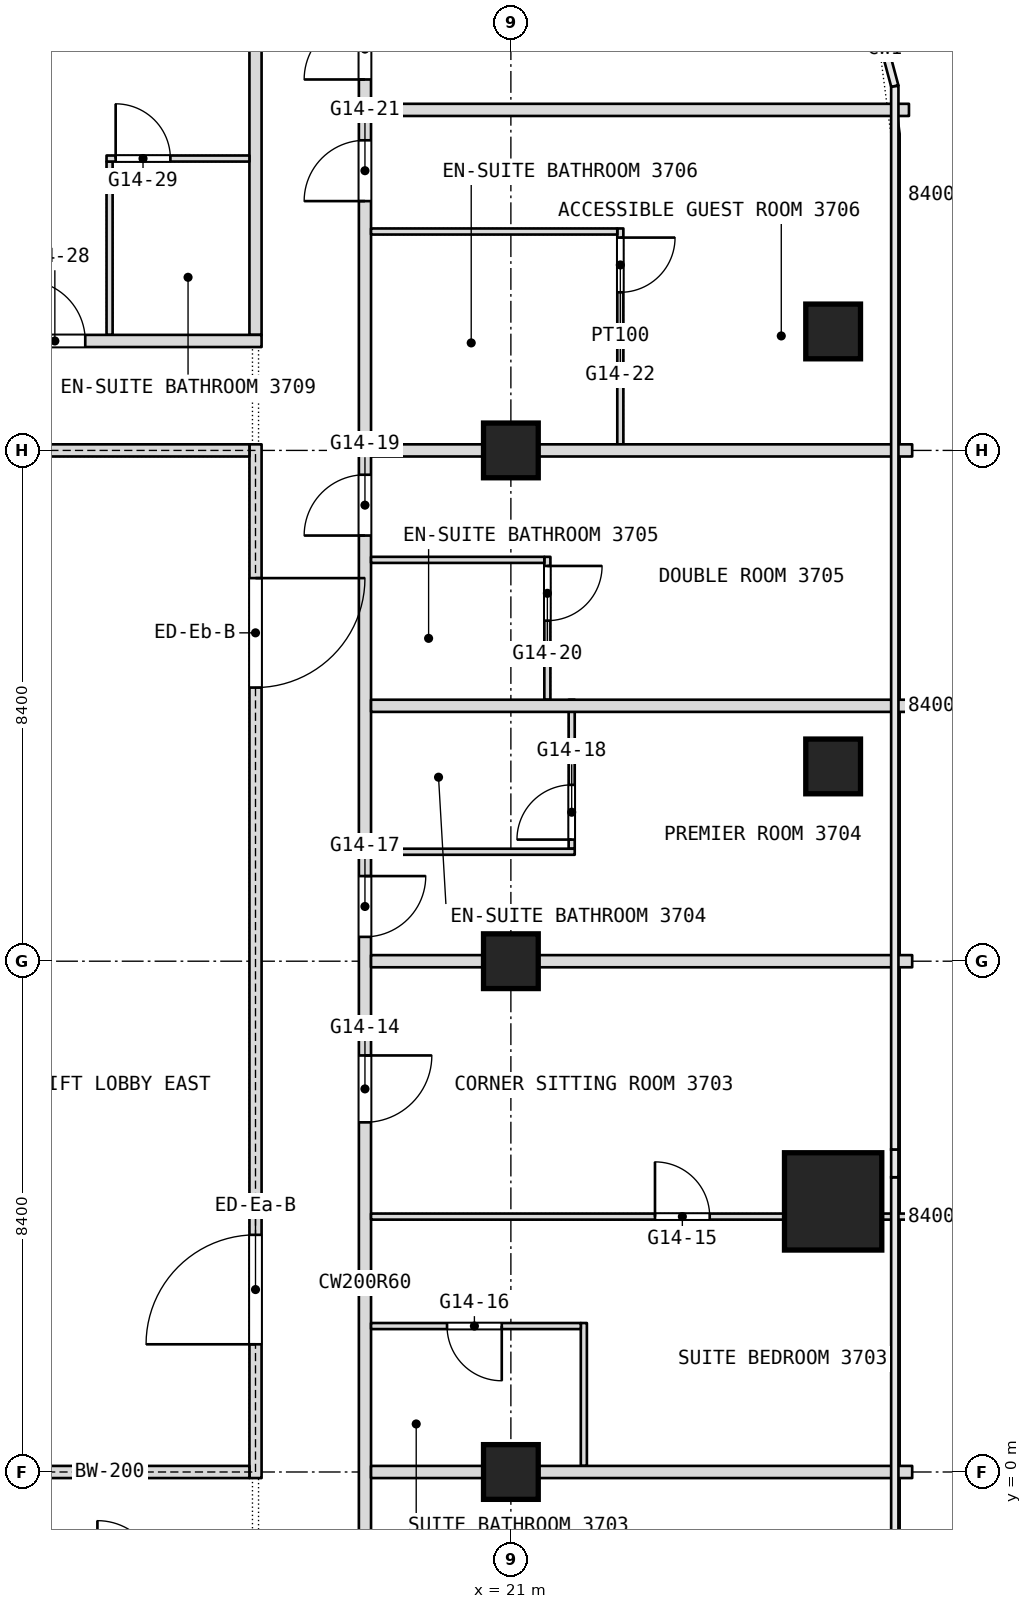
"""IFC4 building model, lengths in metres.
Left out: names, types, materials, properties, quantities, classifications, styles, units other than length and angle.
Written with IfcOpenShell. Run it as: python <this file> out.ifc"""

import sys

from ifc_helpers import new_model, si_unit, direction, frame, frame_2d, origin, origin_2d, place, context, subcontext, project, spatial, rectangle, extrude, element, fill, save


model = new_model("IFC4")
c1 = context("Model", 3, precision=1e-05, world=origin(), true_north=direction((0.0, 1.0)))
c2 = subcontext(c1, "Body", "Model", "MODEL_VIEW")
j1 = project(units=[si_unit("LENGTHUNIT", "METRE"), si_unit("PLANEANGLEUNIT", "RADIAN")], contexts=[c1])
p1 = place(None, origin())
s1 = spatial("IfcSite", under=j1, at=p1, CompositionType="ELEMENT")
p2 = place(p1, origin())
s2 = spatial("IfcBuilding", under=s1, at=p2, CompositionType="ELEMENT")
p3 = place(p2, frame((0.0, 0.0, 158.9)))
s3 = spatial("IfcBuildingStorey", under=s2, at=p3, CompositionType="ELEMENT", Elevation=158.9)
p4 = place(p3, frame((26.3, 4.45, 0.0), z_axis=(0.0, 0.0, 1.0), x_axis=(1.0, 0.0, 0.0)))
e1 = element("IfcColumn", 1, at=p4, inside=s3, PredefinedType="COLUMN", context=c2, shape_type="SweptSolid", body=[
    extrude(rectangle(XDim=1.6, YDim=1.6, at=origin_2d()), origin(), (0.0, 0.0, 1.0), 3.6),
])
for number, where, z_axis, x_axis in (
    (2, (21.0, 0.0, 0.0), (0.0, 0.0, 1.0), (1.0, 0.0, 0.0)),
    (3, (21.0, 8.4, 0.0), (0.0, 0.0, 1.0), (1.0, 0.0, 0.0)),
    (4, (21.0, 16.8, 0.0), (0.0, 0.0, 1.0), (1.0, 0.0, 0.0)),
    (5, (26.3, 18.756, 0.0), (0.0, 0.0, 1.0), (1.0, 0.0, 0.0)),
    (6, (26.3, 11.603, 0.0), (0.0, 0.0, 1.0), (1.0, 0.0, 0.0)),
):
    element("IfcColumn", number, at=place(p3, frame(where, z_axis=z_axis, x_axis=x_axis)), inside=s3, PredefinedType="COLUMN", context=c2, shape_type="SweptSolid", body=[
        extrude(rectangle(XDim=0.9, YDim=0.9, at=origin_2d()), origin(), (0.0, 0.0, 1.0), 3.6),
    ])
p5 = place(p3, frame((22.8, 16.9, 0.0), z_axis=(0.0, 0.0, 1.0), x_axis=(0.0, 1.0, 0.0)))
e7 = element("IfcWall", 7, at=p5, inside=s3, PredefinedType="PARTITIONING", context=c2, shape_type="SweptSolid", body=[
    extrude(rectangle(XDim=3.55, YDim=0.1, at=frame_2d((1.775, 0.0))), origin(), (0.0, 0.0, 1.0), 3.34),
])
p6 = place(p5, frame((2.5, 0.0, 0.0)))
e8 = element("IfcOpeningElement", 8, at=p6, cuts=e7, PredefinedType="OPENING", context=c2, shape_type="SweptSolid", body=[
    extrude(rectangle(XDim=0.9, YDim=2.1, at=frame_2d((0.45, 1.05))), frame((0.0, 0.05, 0.0), z_axis=(0.0, -1.0, 0.0), x_axis=(1.0, 0.0, 0.0)), (0.0, 0.0, 1.0), 0.1),
])
p7 = place(p3, frame((22.2, 0.1, 0.0), z_axis=(0.0, 0.0, 1.0), x_axis=(0.0, 1.0, 0.0)))
e9 = element("IfcWall", 9, at=p7, inside=s3, PredefinedType="PARTITIONING", context=c2, shape_type="SweptSolid", body=[
    extrude(rectangle(XDim=2.35, YDim=0.1, at=frame_2d((1.175, 0.0))), origin(), (0.0, 0.0, 1.0), 3.34),
])
p8 = place(p3, frame((22.0, 10.25, 0.0), z_axis=(0.0, 0.0, 1.0), x_axis=(0.0, 1.0, 0.0)))
e10 = element("IfcWall", 10, at=p8, inside=s3, PredefinedType="PARTITIONING", context=c2, shape_type="SweptSolid", body=[
    extrude(rectangle(XDim=2.45, YDim=0.1, at=frame_2d((1.225, 0.0))), origin(), (0.0, 0.0, 1.0), 3.34),
])
p9 = place(p8, frame((0.15, 0.0, 0.0)))
e11 = element("IfcOpeningElement", 11, at=p9, cuts=e10, PredefinedType="OPENING", context=c2, shape_type="SweptSolid", body=[
    extrude(rectangle(XDim=0.9, YDim=2.1, at=frame_2d((0.45, 1.05))), frame((0.0, 0.05, 0.0), z_axis=(0.0, -1.0, 0.0), x_axis=(1.0, 0.0, 0.0)), (0.0, 0.0, 1.0), 0.1),
])
p10 = place(p3, frame((21.6, 12.7, 0.0), z_axis=(0.0, 0.0, 1.0), x_axis=(0.0, 1.0, 0.0)))
e12 = element("IfcWall", 12, at=p10, inside=s3, PredefinedType="PARTITIONING", context=c2, shape_type="SweptSolid", body=[
    extrude(rectangle(XDim=2.35, YDim=0.1, at=frame_2d((1.175, 0.0))), origin(), (0.0, 0.0, 1.0), 3.34),
])
p11 = place(p10, frame((1.3, 0.0, 0.0)))
e13 = element("IfcOpeningElement", 13, at=p11, cuts=e12, PredefinedType="OPENING", context=c2, shape_type="SweptSolid", body=[
    extrude(rectangle(XDim=0.9, YDim=2.1, at=frame_2d((0.45, 1.05))), frame((0.0, 0.05, 0.0), z_axis=(0.0, -1.0, 0.0), x_axis=(1.0, 0.0, 0.0)), (0.0, 0.0, 1.0), 0.1),
])
p12 = place(p3, frame((18.6, -21.708, 0.0), z_axis=(0.0, 0.0, 1.0), x_axis=(0.0, 1.0, 0.0)))
e14 = element("IfcWall", 14, at=p12, inside=s3, PredefinedType="PARTITIONING", context=c2, shape_type="SweptSolid", body=[
    extrude(rectangle(XDim=49.648, YDim=0.2, at=frame_2d((24.824, 0.0))), origin(), (0.0, 0.0, 1.0), 3.34),
])
p13 = place(p12, frame((2.204, 0.0, 0.0)))
e15 = element("IfcOpeningElement", 15, at=p13, cuts=e14, PredefinedType="OPENING", context=c2, shape_type="SweptSolid", body=[
    extrude(rectangle(XDim=0.9, YDim=2.1, at=frame_2d((0.45, 1.05))), frame((0.0, 0.1, 0.0), z_axis=(0.0, -1.0, 0.0), x_axis=(1.0, 0.0, 0.0)), (0.0, 0.0, 1.0), 0.2),
])
p14 = place(p12, frame((8.608, 0.0, 0.0)))
e16 = element("IfcOpeningElement", 16, at=p14, cuts=e14, PredefinedType="OPENING", context=c2, shape_type="SweptSolid", body=[
    extrude(rectangle(XDim=1.1, YDim=2.1, at=frame_2d((0.55, 1.05))), frame((0.0, 0.1, 0.0), z_axis=(0.0, -1.0, 0.0), x_axis=(1.0, 0.0, 0.0)), (0.0, 0.0, 1.0), 0.2),
])
p15 = place(p12, frame((16.608, 0.0, 0.0)))
e17 = element("IfcOpeningElement", 17, at=p15, cuts=e14, PredefinedType="OPENING", context=c2, shape_type="SweptSolid", body=[
    extrude(rectangle(XDim=1.8, YDim=2.1, at=frame_2d((0.9, 1.05))), frame((0.0, 0.1, 0.0), z_axis=(0.0, -1.0, 0.0), x_axis=(1.0, 0.0, 0.0)), (0.0, 0.0, 1.0), 0.2),
])
p16 = place(p12, frame((27.458, 0.0, 0.0)))
e18 = element("IfcOpeningElement", 18, at=p16, cuts=e14, PredefinedType="OPENING", context=c2, shape_type="SweptSolid", body=[
    extrude(rectangle(XDim=1.1, YDim=2.1, at=frame_2d((0.55, 1.05))), frame((0.0, 0.1, 0.0), z_axis=(0.0, -1.0, 0.0), x_axis=(1.0, 0.0, 0.0)), (0.0, 0.0, 1.0), 0.2),
])
p17 = place(p12, frame((30.508, 0.0, 0.0)))
e19 = element("IfcOpeningElement", 19, at=p17, cuts=e14, PredefinedType="OPENING", context=c2, shape_type="SweptSolid", body=[
    extrude(rectangle(XDim=1.0, YDim=2.1, at=frame_2d((0.5, 1.05))), frame((0.0, 0.1, 0.0), z_axis=(0.0, -1.0, 0.0), x_axis=(1.0, 0.0, 0.0)), (0.0, 0.0, 1.0), 0.2),
])
p18 = place(p12, frame((37.108, 0.0, 0.0)))
e20 = element("IfcOpeningElement", 20, at=p18, cuts=e14, PredefinedType="OPENING", context=c2, shape_type="SweptSolid", body=[
    extrude(rectangle(XDim=1.0, YDim=2.1, at=frame_2d((0.5, 1.05))), frame((0.0, 0.1, 0.0), z_axis=(0.0, -1.0, 0.0), x_axis=(1.0, 0.0, 0.0)), (0.0, 0.0, 1.0), 0.2),
])
p19 = place(p12, frame((42.608, 0.0, 0.0)))
e21 = element("IfcOpeningElement", 21, at=p19, cuts=e14, PredefinedType="OPENING", context=c2, shape_type="SweptSolid", body=[
    extrude(rectangle(XDim=1.0, YDim=2.1, at=frame_2d((0.5, 1.05))), frame((0.0, 0.1, 0.0), z_axis=(0.0, -1.0, 0.0), x_axis=(1.0, 0.0, 0.0)), (0.0, 0.0, 1.0), 0.2),
])
p20 = place(p12, frame((44.608, 0.0, 0.0)))
e22 = element("IfcOpeningElement", 22, at=p20, cuts=e14, PredefinedType="OPENING", context=c2, shape_type="SweptSolid", body=[
    extrude(rectangle(XDim=1.0, YDim=2.1, at=frame_2d((0.5, 1.05))), frame((0.0, 0.1, 0.0), z_axis=(0.0, -1.0, 0.0), x_axis=(1.0, 0.0, 0.0)), (0.0, 0.0, 1.0), 0.2),
])
p21 = place(p3, frame((16.8, 18.7, 0.0), z_axis=(0.0, 0.0, 1.0), x_axis=(0.0, 1.0, 0.0)))
e23 = element("IfcWall", 23, at=p21, inside=s3, PredefinedType="PARTITIONING", context=c2, shape_type="SweptSolid", body=[
    extrude(rectangle(XDim=9.24, YDim=0.2, at=frame_2d((4.62, 0.0))), origin(), (0.0, 0.0, 1.0), 3.34),
])
p22 = place(p3, frame((14.4, 18.7, 0.0), z_axis=(0.0, 0.0, 1.0), x_axis=(0.0, 1.0, 0.0)))
e24 = element("IfcWall", 24, at=p22, inside=s3, PredefinedType="PARTITIONING", context=c2, shape_type="SweptSolid", body=[
    extrude(rectangle(XDim=2.85, YDim=0.1, at=frame_2d((1.425, 0.0))), origin(), (0.0, 0.0, 1.0), 3.34),
])
p23 = place(p3, frame((18.7, 0.0, 0.0), z_axis=(0.0, 0.0, 1.0), x_axis=(1.0, 0.0, 0.0)))
e25 = element("IfcWall", 25, at=p23, inside=s3, PredefinedType="PARTITIONING", context=c2, shape_type="SweptSolid", body=[
    extrude(rectangle(XDim=8.9, YDim=0.2, at=frame_2d((4.45, 0.0))), origin(), (0.0, 0.0, 1.0), 2.89),
])
p24 = place(p3, frame((18.7, 2.4, 0.0), z_axis=(0.0, 0.0, 1.0), x_axis=(1.0, 0.0, 0.0)))
e26 = element("IfcWall", 26, at=p24, inside=s3, PredefinedType="PARTITIONING", context=c2, shape_type="SweptSolid", body=[
    extrude(rectangle(XDim=3.45, YDim=0.1, at=frame_2d((1.725, 0.0))), origin(), (0.0, 0.0, 1.0), 3.34),
])
p25 = place(p24, frame((1.25, 0.0, 0.0)))
e27 = element("IfcOpeningElement", 27, at=p25, cuts=e26, PredefinedType="OPENING", context=c2, shape_type="SweptSolid", body=[
    extrude(rectangle(XDim=0.9, YDim=2.1, at=frame_2d((0.45, 1.05))), frame((0.0, 0.05, 0.0), z_axis=(0.0, -1.0, 0.0), x_axis=(1.0, 0.0, 0.0)), (0.0, 0.0, 1.0), 0.1),
])
p26 = place(p3, frame((18.7, 4.2, 0.0), z_axis=(0.0, 0.0, 1.0), x_axis=(1.0, 0.0, 0.0)))
e28 = element("IfcWall", 28, at=p26, inside=s3, PredefinedType="PARTITIONING", context=c2, shape_type="SweptSolid", body=[
    extrude(rectangle(XDim=6.8, YDim=0.1, at=frame_2d((3.4, 0.0))), origin(), (0.0, 0.0, 1.0), 3.34),
])
p27 = place(p26, frame((4.67, 0.0, 0.0)))
e29 = element("IfcOpeningElement", 29, at=p27, cuts=e28, PredefinedType="OPENING", context=c2, shape_type="SweptSolid", body=[
    extrude(rectangle(XDim=0.9, YDim=2.1, at=frame_2d((0.45, 1.05))), frame((0.0, 0.05, 0.0), z_axis=(0.0, -1.0, 0.0), x_axis=(1.0, 0.0, 0.0)), (0.0, 0.0, 1.0), 0.1),
])
p28 = place(p3, frame((27.1, 4.2, 0.0), z_axis=(0.0, 0.0, 1.0), x_axis=(1.0, 0.0, 0.0)))
e30 = element("IfcWall", 30, at=p28, inside=s3, PredefinedType="PARTITIONING", context=c2, shape_type="SweptSolid", body=[
    extrude(rectangle(XDim=0.5, YDim=0.1, at=frame_2d((0.25, 0.0))), origin(), (0.0, 0.0, 1.0), 3.34),
])
p29 = place(p3, frame((18.7, 8.4, 0.0), z_axis=(0.0, 0.0, 1.0), x_axis=(1.0, 0.0, 0.0)))
e31 = element("IfcWall", 31, at=p29, inside=s3, PredefinedType="PARTITIONING", context=c2, shape_type="SweptSolid", body=[
    extrude(rectangle(XDim=8.9, YDim=0.2, at=frame_2d((4.45, 0.0))), origin(), (0.0, 0.0, 1.0), 2.89),
])
p30 = place(p3, frame((18.7, 10.2, 0.0), z_axis=(0.0, 0.0, 1.0), x_axis=(1.0, 0.0, 0.0)))
e32 = element("IfcWall", 32, at=p30, inside=s3, PredefinedType="PARTITIONING", context=c2, shape_type="SweptSolid", body=[
    extrude(rectangle(XDim=3.35, YDim=0.1, at=frame_2d((1.675, 0.0))), origin(), (0.0, 0.0, 1.0), 3.34),
])
p31 = place(p3, frame((18.7, 12.6, 0.0), z_axis=(0.0, 0.0, 1.0), x_axis=(1.0, 0.0, 0.0)))
e33 = element("IfcWall", 33, at=p31, inside=s3, PredefinedType="PARTITIONING", context=c2, shape_type="SweptSolid", body=[
    extrude(rectangle(XDim=8.9, YDim=0.2, at=frame_2d((4.45, 0.0))), origin(), (0.0, 0.0, 1.0), 3.34),
])
p32 = place(p3, frame((18.7, 15.0, 0.0), z_axis=(0.0, 0.0, 1.0), x_axis=(1.0, 0.0, 0.0)))
e34 = element("IfcWall", 34, at=p32, inside=s3, PredefinedType="PARTITIONING", context=c2, shape_type="SweptSolid", body=[
    extrude(rectangle(XDim=2.85, YDim=0.1, at=frame_2d((1.425, 0.0))), origin(), (0.0, 0.0, 1.0), 3.34),
])
p33 = place(p3, frame((18.7, 16.8, 0.0), z_axis=(0.0, 0.0, 1.0), x_axis=(1.0, 0.0, 0.0)))
e35 = element("IfcWall", 35, at=p33, inside=s3, PredefinedType="PARTITIONING", context=c2, shape_type="SweptSolid", body=[
    extrude(rectangle(XDim=8.9, YDim=0.2, at=frame_2d((4.45, 0.0))), origin(), (0.0, 0.0, 1.0), 2.89),
])
p34 = place(p3, frame((10.7, 18.6, 0.0), z_axis=(0.0, 0.0, 1.0), x_axis=(1.0, 0.0, 0.0)))
e36 = element("IfcWall", 36, at=p34, inside=s3, PredefinedType="PARTITIONING", context=c2, shape_type="SweptSolid", body=[
    extrude(rectangle(XDim=6.2, YDim=0.2, at=frame_2d((3.1, 0.0))), origin(), (0.0, 0.0, 1.0), 3.34),
])
p35 = place(p34, frame((2.3, 0.0, 0.0)))
e37 = element("IfcOpeningElement", 37, at=p35, cuts=e36, PredefinedType="OPENING", context=c2, shape_type="SweptSolid", body=[
    extrude(rectangle(XDim=1.0, YDim=2.1, at=frame_2d((0.5, 1.05))), frame((0.0, 0.1, 0.0), z_axis=(0.0, -1.0, 0.0), x_axis=(1.0, 0.0, 0.0)), (0.0, 0.0, 1.0), 0.2),
])
p36 = place(p3, frame((18.7, 20.4, 0.0), z_axis=(0.0, 0.0, 1.0), x_axis=(1.0, 0.0, 0.0)))
e38 = element("IfcWall", 38, at=p36, inside=s3, PredefinedType="PARTITIONING", context=c2, shape_type="SweptSolid", body=[
    extrude(rectangle(XDim=4.05, YDim=0.1, at=frame_2d((2.025, 0.0))), origin(), (0.0, 0.0, 1.0), 3.34),
])
p37 = place(p3, frame((14.35, 21.6, 0.0), z_axis=(0.0, 0.0, 1.0), x_axis=(1.0, 0.0, 0.0)))
e39 = element("IfcWall", 39, at=p37, inside=s3, PredefinedType="PARTITIONING", context=c2, shape_type="SweptSolid", body=[
    extrude(rectangle(XDim=2.35, YDim=0.1, at=frame_2d((1.175, 0.0))), origin(), (0.0, 0.0, 1.0), 3.34),
])
p38 = place(p37, frame((0.15, 0.0, 0.0)))
e40 = element("IfcOpeningElement", 40, at=p38, cuts=e39, PredefinedType="OPENING", context=c2, shape_type="SweptSolid", body=[
    extrude(rectangle(XDim=0.9, YDim=2.1, at=frame_2d((0.45, 1.05))), frame((0.0, 0.05, 0.0), z_axis=(0.0, -1.0, 0.0), x_axis=(1.0, 0.0, 0.0)), (0.0, 0.0, 1.0), 0.1),
])
p39 = place(p3, frame((18.7, 22.4, 0.0), z_axis=(0.0, 0.0, 1.0), x_axis=(1.0, 0.0, 0.0)))
e41 = element("IfcWall", 41, at=p39, inside=s3, PredefinedType="PARTITIONING", context=c2, shape_type="SweptSolid", body=[
    extrude(rectangle(XDim=8.847, YDim=0.2, at=frame_2d((4.424, 0.0))), origin(), (0.0, 0.0, 1.0), 3.34),
])
p40 = place(p3, frame((16.8, -0.1, 0.0), z_axis=(0.0, 0.0, 1.0), x_axis=(0.0, 1.0, 0.0)))
e42 = element("IfcWall", 42, at=p40, inside=s3, PredefinedType="PARTITIONING", context=c2, shape_type="SweptSolid", body=[
    extrude(rectangle(XDim=17.0, YDim=0.2, at=frame_2d((8.5, 0.0))), origin(), (0.0, 0.0, 1.0), 3.34),
])
p41 = place(p40, frame((2.2, 0.0, 0.0)))
e43 = element("IfcOpeningElement", 43, at=p41, cuts=e42, PredefinedType="OPENING", context=c2, shape_type="SweptSolid", body=[
    extrude(rectangle(XDim=1.8, YDim=2.1, at=frame_2d((0.9, 1.05))), frame((0.0, 0.1, 0.0), z_axis=(0.0, -1.0, 0.0), x_axis=(1.0, 0.0, 0.0)), (0.0, 0.0, 1.0), 0.2),
])
p42 = place(p40, frame((13.0, 0.0, 0.0)))
e44 = element("IfcOpeningElement", 44, at=p42, cuts=e42, PredefinedType="OPENING", context=c2, shape_type="SweptSolid", body=[
    extrude(rectangle(XDim=1.8, YDim=2.1, at=frame_2d((0.9, 1.05))), frame((0.0, 0.1, 0.0), z_axis=(0.0, -1.0, 0.0), x_axis=(1.0, 0.0, 0.0)), (0.0, 0.0, 1.0), 0.2),
])
for number, where, z_axis, x_axis in (
    (45, (12.1, 0.0, 0.0), (0.0, 0.0, 1.0), (1.0, 0.0, 0.0)),
    (46, (12.1, 16.8, 0.0), (0.0, 0.0, 1.0), (1.0, 0.0, 0.0)),
):
    element("IfcWall", number, at=place(p3, frame(where, z_axis=z_axis, x_axis=x_axis)), inside=s3, PredefinedType="PARTITIONING", context=c2, shape_type="SweptSolid", body=[
        extrude(rectangle(XDim=4.6, YDim=0.2, at=frame_2d((2.3, 0.0))), origin(), (0.0, 0.0, 1.0), 2.89),
    ])
p43 = place(p6, origin())
e47 = element("IfcDoor", 47, at=p43, inside=s3, OperationType="SINGLE_SWING_RIGHT", PredefinedType="DOOR", context=c2, shape_type="SweptSolid", body=[
    extrude(rectangle(XDim=0.9, YDim=2.1, at=frame_2d((0.45, 1.05))), frame((0.0, 0.025, 0.0), z_axis=(0.0, -1.0, 0.0), x_axis=(1.0, 0.0, 0.0)), (0.0, 0.0, 1.0), 0.05),
])
fill(e8, e47)
p44 = place(p9, origin())
e48 = element("IfcDoor", 48, at=p44, inside=s3, OperationType="SINGLE_SWING_LEFT", PredefinedType="DOOR", context=c2, shape_type="SweptSolid", body=[
    extrude(rectangle(XDim=0.9, YDim=2.1, at=frame_2d((0.45, 1.05))), frame((0.0, 0.025, 0.0), z_axis=(0.0, -1.0, 0.0), x_axis=(1.0, 0.0, 0.0)), (0.0, 0.0, 1.0), 0.05),
])
fill(e11, e48)
p45 = place(p11, origin())
e49 = element("IfcDoor", 49, at=p45, inside=s3, OperationType="SINGLE_SWING_RIGHT", PredefinedType="DOOR", context=c2, shape_type="SweptSolid", body=[
    extrude(rectangle(XDim=0.9, YDim=2.1, at=frame_2d((0.45, 1.05))), frame((0.0, 0.025, 0.0), z_axis=(0.0, -1.0, 0.0), x_axis=(1.0, 0.0, 0.0)), (0.0, 0.0, 1.0), 0.05),
])
fill(e13, e49)
p46 = place(p16, origin())
e50 = element("IfcDoor", 50, at=p46, inside=s3, OperationType="SINGLE_SWING_RIGHT", PredefinedType="DOOR", context=c2, shape_type="SweptSolid", body=[
    extrude(rectangle(XDim=1.1, YDim=2.1, at=frame_2d((0.55, 1.05))), frame((0.0, 0.025, 0.0), z_axis=(0.0, -1.0, 0.0), x_axis=(1.0, 0.0, 0.0)), (0.0, 0.0, 1.0), 0.05),
])
fill(e18, e50)
p47 = place(p17, origin())
e51 = element("IfcDoor", 51, at=p47, inside=s3, OperationType="SINGLE_SWING_LEFT", PredefinedType="DOOR", context=c2, shape_type="SweptSolid", body=[
    extrude(rectangle(XDim=1.0, YDim=2.1, at=frame_2d((0.5, 1.05))), frame((0.0, 0.025, 0.0), z_axis=(0.0, -1.0, 0.0), x_axis=(1.0, 0.0, 0.0)), (0.0, 0.0, 1.0), 0.05),
])
fill(e19, e51)
p48 = place(p18, origin())
e52 = element("IfcDoor", 52, at=p48, inside=s3, OperationType="SINGLE_SWING_LEFT", PredefinedType="DOOR", context=c2, shape_type="SweptSolid", body=[
    extrude(rectangle(XDim=1.0, YDim=2.1, at=frame_2d((0.5, 1.05))), frame((0.0, 0.025, 0.0), z_axis=(0.0, -1.0, 0.0), x_axis=(1.0, 0.0, 0.0)), (0.0, 0.0, 1.0), 0.05),
])
fill(e20, e52)
p49 = place(p19, origin())
e53 = element("IfcDoor", 53, at=p49, inside=s3, OperationType="SINGLE_SWING_LEFT", PredefinedType="DOOR", context=c2, shape_type="SweptSolid", body=[
    extrude(rectangle(XDim=1.0, YDim=2.1, at=frame_2d((0.5, 1.05))), frame((0.0, 0.025, 0.0), z_axis=(0.0, -1.0, 0.0), x_axis=(1.0, 0.0, 0.0)), (0.0, 0.0, 1.0), 0.05),
])
fill(e21, e53)
p50 = place(p20, origin())
e54 = element("IfcDoor", 54, at=p50, inside=s3, OperationType="SINGLE_SWING_LEFT", PredefinedType="DOOR", context=c2, shape_type="SweptSolid", body=[
    extrude(rectangle(XDim=1.0, YDim=2.1, at=frame_2d((0.5, 1.05))), frame((0.0, 0.025, 0.0), z_axis=(0.0, -1.0, 0.0), x_axis=(1.0, 0.0, 0.0)), (0.0, 0.0, 1.0), 0.05),
])
fill(e22, e54)
p51 = place(p25, origin())
e55 = element("IfcDoor", 55, at=p51, inside=s3, OperationType="SINGLE_SWING_RIGHT", PredefinedType="DOOR", context=c2, shape_type="SweptSolid", body=[
    extrude(rectangle(XDim=0.9, YDim=2.1, at=frame_2d((0.45, 1.05))), frame((0.0, 0.025, 0.0), z_axis=(0.0, -1.0, 0.0), x_axis=(1.0, 0.0, 0.0)), (0.0, 0.0, 1.0), 0.05),
])
fill(e27, e55)
p52 = place(p27, origin())
e56 = element("IfcDoor", 56, at=p52, inside=s3, OperationType="SINGLE_SWING_LEFT", PredefinedType="DOOR", context=c2, shape_type="SweptSolid", body=[
    extrude(rectangle(XDim=0.9, YDim=2.1, at=frame_2d((0.45, 1.05))), frame((0.0, 0.025, 0.0), z_axis=(0.0, -1.0, 0.0), x_axis=(1.0, 0.0, 0.0)), (0.0, 0.0, 1.0), 0.05),
])
fill(e29, e56)
p53 = place(p35, origin())
e57 = element("IfcDoor", 57, at=p53, inside=s3, OperationType="SINGLE_SWING_LEFT", PredefinedType="DOOR", context=c2, shape_type="SweptSolid", body=[
    extrude(rectangle(XDim=1.0, YDim=2.1, at=frame_2d((0.5, 1.05))), frame((0.0, 0.025, 0.0), z_axis=(0.0, -1.0, 0.0), x_axis=(1.0, 0.0, 0.0)), (0.0, 0.0, 1.0), 0.05),
])
fill(e37, e57)
p54 = place(p38, origin())
e58 = element("IfcDoor", 58, at=p54, inside=s3, OperationType="SINGLE_SWING_RIGHT", PredefinedType="DOOR", context=c2, shape_type="SweptSolid", body=[
    extrude(rectangle(XDim=0.9, YDim=2.1, at=frame_2d((0.45, 1.05))), frame((0.0, 0.025, 0.0), z_axis=(0.0, -1.0, 0.0), x_axis=(1.0, 0.0, 0.0)), (0.0, 0.0, 1.0), 0.05),
])
fill(e40, e58)
p55 = place(p41, origin())
e59 = element("IfcDoor", 59, at=p55, inside=s3, OperationType="DOUBLE_DOOR_SINGLE_SWING", PredefinedType="DOOR", context=c2, shape_type="SweptSolid", body=[
    extrude(rectangle(XDim=1.8, YDim=2.1, at=frame_2d((0.9, 1.05))), frame((0.0, 0.025, 0.0), z_axis=(0.0, -1.0, 0.0), x_axis=(1.0, 0.0, 0.0)), (0.0, 0.0, 1.0), 0.05),
])
fill(e43, e59)
p56 = place(p42, origin())
e60 = element("IfcDoor", 60, at=p56, inside=s3, OperationType="DOUBLE_DOOR_SINGLE_SWING", PredefinedType="DOOR", context=c2, shape_type="SweptSolid", body=[
    extrude(rectangle(XDim=1.8, YDim=2.1, at=frame_2d((0.9, 1.05))), frame((0.0, 0.025, 0.0), z_axis=(0.0, -1.0, 0.0), x_axis=(1.0, 0.0, 0.0)), (0.0, 0.0, 1.0), 0.05),
])
fill(e44, e60)
save(model, sys.argv[1])
